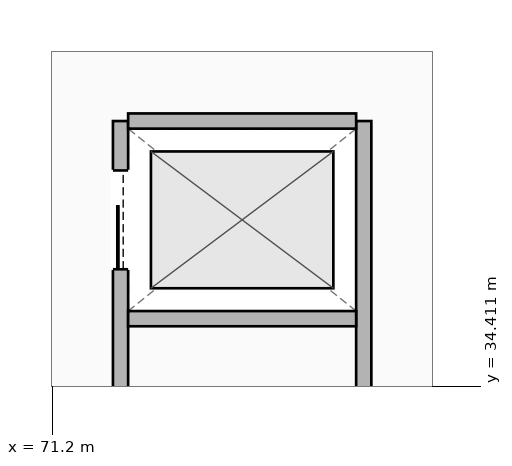
"""IFC4 building model, lengths in metres.
Left out: names, types, materials, properties, quantities, classifications, styles, units other than length and angle.
Written with IfcOpenShell. Run it as: python <this file> out.ifc"""

import sys

from ifc_helpers import new_model, si_unit, direction, frame, frame_2d, origin, place, context, subcontext, project, spatial, rectangle, extrude, element, fill, save


model = new_model("IFC4")
c1 = context("Model", 3, precision=1e-05, world=origin(), true_north=direction((0.0, 1.0)))
c2 = subcontext(c1, "Body", "Model", "MODEL_VIEW")
j1 = project(units=[si_unit("LENGTHUNIT", "METRE"), si_unit("PLANEANGLEUNIT", "RADIAN")], contexts=[c1])
p1 = place(None, origin())
s1 = spatial("IfcSite", under=j1, at=p1, CompositionType="ELEMENT")
p2 = place(p1, origin())
s2 = spatial("IfcBuilding", under=s1, at=p2, CompositionType="ELEMENT")
p3 = place(p2, origin())
s3 = spatial("IfcBuildingStorey", under=s2, at=p3, CompositionType="ELEMENT", Elevation=0.0)
p4 = place(p3, frame((72.1, 26.1, 0.0), z_axis=(0.0, 0.0, 1.0), x_axis=(0.0, 1.0, 0.0)))
e1 = element("IfcWall", 1, at=p4, inside=s3, PredefinedType="SOLIDWALL", context=c2, shape_type="SweptSolid", body=[
    extrude(rectangle(XDim=11.8, YDim=0.2, at=frame_2d((5.9, 0.0))), origin(), (0.0, 0.0, 1.0), 3.31),
])
p5 = place(p4, frame((0.65, 0.0, 0.0)))
e2 = element("IfcOpeningElement", 2, at=p5, cuts=e1, PredefinedType="OPENING", context=c2, shape_type="SweptSolid", body=[
    extrude(rectangle(XDim=1.3, YDim=2.25, at=frame_2d((0.65, 1.125))), frame((0.0, 0.11, 0.0), z_axis=(0.0, -1.0, 0.0), x_axis=(1.0, 0.0, 0.0)), (0.0, 0.0, 1.0), 0.22),
])
p6 = place(p4, frame((9.85, 0.0, 0.0)))
e3 = element("IfcOpeningElement", 3, at=p6, cuts=e1, PredefinedType="OPENING", context=c2, shape_type="SweptSolid", body=[
    extrude(rectangle(XDim=1.3, YDim=2.25, at=frame_2d((0.65, 1.125))), frame((0.0, 0.11, 0.0), z_axis=(0.0, -1.0, 0.0), x_axis=(1.0, 0.0, 0.0)), (0.0, 0.0, 1.0), 0.22),
])
p7 = place(p3, frame((75.3, 26.1, 0.0), z_axis=(0.0, 0.0, 1.0), x_axis=(0.0, 1.0, 0.0)))
e4 = element("IfcWall", 4, at=p7, inside=s3, PredefinedType="SOLIDWALL", context=c2, shape_type="SweptSolid", body=[
    extrude(rectangle(XDim=11.8, YDim=0.2, at=frame_2d((5.9, 0.0))), origin(), (0.0, 0.0, 1.0), 3.31),
])
for number, where, z_axis, x_axis in (
    (5, (72.2, 35.3, 0.0), (0.0, 0.0, 1.0), (1.0, 0.0, 0.0)),
    (6, (72.2, 37.9, 0.0), (0.0, 0.0, 1.0), (1.0, 0.0, 0.0)),
):
    element("IfcWall", number, at=place(p3, frame(where, z_axis=z_axis, x_axis=x_axis)), inside=s3, PredefinedType="SOLIDWALL", context=c2, shape_type="SweptSolid", body=[
        extrude(rectangle(XDim=3.0, YDim=0.2, at=frame_2d((1.5, 0.0))), origin(), (0.0, 0.0, 1.0), 3.31),
    ])
p8 = place(p6, origin())
e7 = element("IfcDoor", 7, at=p8, inside=s3, OperationType="SLIDING_TO_LEFT", PredefinedType="DOOR", context=c2, shape_type="SweptSolid", body=[
    extrude(rectangle(XDim=1.3, YDim=2.25, at=frame_2d((0.65, 1.125))), frame((0.0, 0.025, 0.0), z_axis=(0.0, -1.0, 0.0), x_axis=(1.0, 0.0, 0.0)), (0.0, 0.0, 1.0), 0.05),
])
fill(e3, e7)
save(model, sys.argv[1])
